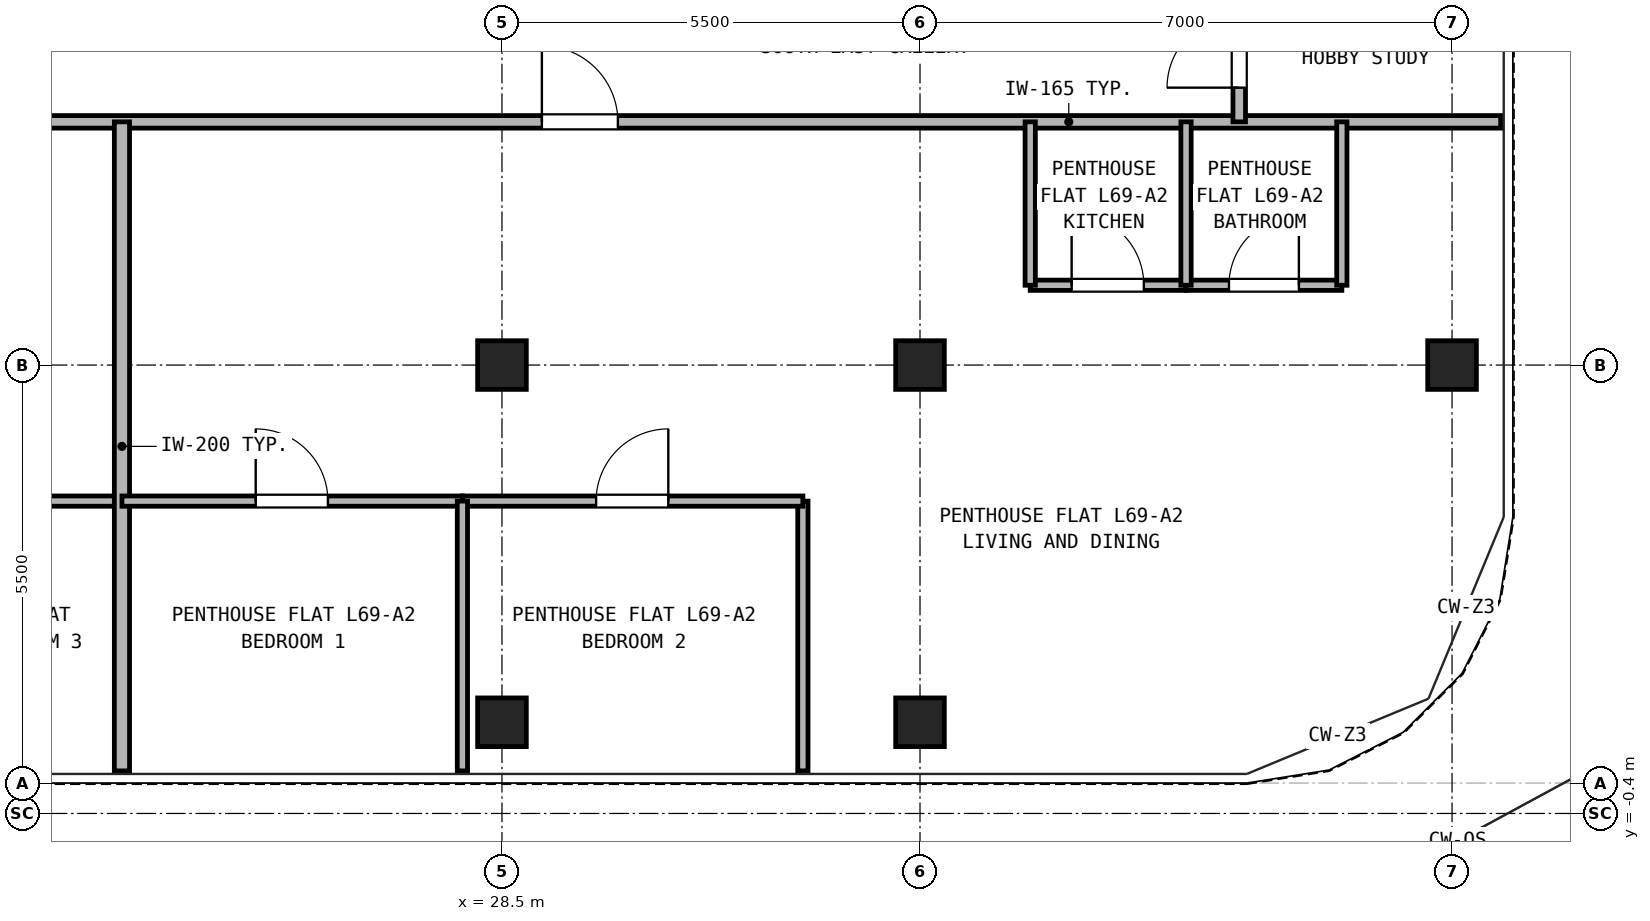
"""IFC4 building model, lengths in metres.
Left out: names, types, materials, properties, quantities, classifications, styles, units other than length and angle.
Written with IfcOpenShell. Run it as: python <this file> out.ifc"""

import sys

from ifc_helpers import new_model, si_unit, direction, frame, frame_2d, origin, origin_2d, place, context, subcontext, project, spatial, rectangle, hollow_rectangle, extrude, source, transform, mapped, element, fill, save


model = new_model("IFC4")
c1 = context("Model", 3, precision=1e-05, world=origin(), true_north=direction((0.0, 1.0)))
c2 = subcontext(c1, "Body", "Model", "MODEL_VIEW")
j1 = project(units=[si_unit("LENGTHUNIT", "METRE"), si_unit("PLANEANGLEUNIT", "RADIAN")], contexts=[c1])
p1 = place(None, origin())
s1 = spatial("IfcSite", under=j1, at=p1, CompositionType="ELEMENT")
p2 = place(p1, origin())
s2 = spatial("IfcBuilding", under=s1, at=p2, CompositionType="ELEMENT")
p3 = place(p2, frame((0.0, 0.0, 242.5)))
s3 = spatial("IfcBuildingStorey", under=s2, at=p3, CompositionType="ELEMENT", Elevation=242.5)
m1 = source(origin(), c2, "Body", "SweptSolid", [
    extrude(hollow_rectangle(XDim=0.64, YDim=0.64, WallThickness=0.035, at=origin_2d()), origin(), (0.0, 0.0, 1.0), 2.98),
])
for number, where, z_axis, x_axis in (
    (1, (28.5, 0.8, 0.0), (0.0, 0.0, 1.0), (1.0, 0.0, 0.0)),
    (2, (34.0, 0.8, 0.0), (0.0, 0.0, 1.0), (1.0, 0.0, 0.0)),
    (3, (41.0, 5.5, 0.0), (0.0, 0.0, 1.0), (1.0, 0.0, 0.0)),
    (4, (28.5, 5.5, 0.0), (0.0, 0.0, 1.0), (1.0, 0.0, 0.0)),
    (5, (34.0, 5.5, 0.0), (0.0, 0.0, 1.0), (1.0, 0.0, 0.0)),
):
    element("IfcColumn", number, at=place(p3, frame(where, z_axis=z_axis, x_axis=x_axis)), inside=s3, PredefinedType="COLUMN", context=c2, shape_type="MappedRepresentation", body=[
        mapped(m1, transform((0.0, 0.0, 0.0), x_axis=(1.0, 0.0, 0.0), y_axis=(0.0, 1.0, 0.0), z_axis=(0.0, 0.0, 1.0), scale=1.0)),
    ])
p4 = place(p3, frame((5.36, 8.7, 0.0), z_axis=(0.0, 0.0, 1.0), x_axis=(1.0, 0.0, 0.0)))
e6 = element("IfcWall", 6, at=p4, inside=s3, PredefinedType="PARTITIONING", context=c2, shape_type="SweptSolid", body=[
    extrude(rectangle(XDim=36.28, YDim=0.165, at=frame_2d((18.14, 0.0))), origin(), (0.0, 0.0, 1.0), 2.655),
])
p5 = place(p4, frame((11.615, 0.0, 0.0)))
e7 = element("IfcOpeningElement", 7, at=p5, cuts=e6, PredefinedType="OPENING", context=c2, shape_type="SweptSolid", body=[
    extrude(rectangle(XDim=1.0, YDim=2.15, at=frame_2d((0.5, 1.075))), frame((0.0, 0.093, 0.0), z_axis=(0.0, -1.0, 0.0), x_axis=(1.0, 0.0, 0.0)), (0.0, 0.0, 1.0), 0.185),
])
p6 = place(p4, frame((23.665, 0.0, 0.0)))
e8 = element("IfcOpeningElement", 8, at=p6, cuts=e6, PredefinedType="OPENING", context=c2, shape_type="SweptSolid", body=[
    extrude(rectangle(XDim=1.0, YDim=2.15, at=frame_2d((0.5, 1.075))), frame((0.0, 0.093, 0.0), z_axis=(0.0, -1.0, 0.0), x_axis=(1.0, 0.0, 0.0)), (0.0, 0.0, 1.0), 0.185),
])
p7 = place(p3, frame((38.2, 8.7, 0.0), z_axis=(0.0, 0.0, 1.0), x_axis=(0.0, 1.0, 0.0)))
e9 = element("IfcWall", 9, at=p7, inside=s3, PredefinedType="PARTITIONING", context=c2, shape_type="SweptSolid", body=[
    extrude(rectangle(XDim=2.0, YDim=0.165, at=frame_2d((1.0, 0.0))), origin(), (0.0, 0.0, 1.0), 2.98),
])
p8 = place(p7, frame((0.45, 0.0, 0.0)))
e10 = element("IfcOpeningElement", 10, at=p8, cuts=e9, PredefinedType="OPENING", context=c2, shape_type="SweptSolid", body=[
    extrude(rectangle(XDim=0.95, YDim=2.15, at=frame_2d((0.475, 1.075))), frame((0.0, 0.093, 0.0), z_axis=(0.0, -1.0, 0.0), x_axis=(1.0, 0.0, 0.0)), (0.0, 0.0, 1.0), 0.185),
])
p9 = place(p3, frame((20.05, 3.71, 0.0), z_axis=(0.0, 0.0, 1.0), x_axis=(1.0, 0.0, 0.0)))
e11 = element("IfcWall", 11, at=p9, inside=s3, PredefinedType="PARTITIONING", context=c2, shape_type="SweptSolid", body=[
    extrude(rectangle(XDim=3.45, YDim=0.135, at=frame_2d((1.725, 0.0))), origin(), (0.0, 0.0, 1.0), 2.98),
])
p10 = place(p9, frame((1.245, 0.0, 0.0)))
e12 = element("IfcOpeningElement", 12, at=p10, cuts=e11, PredefinedType="OPENING", context=c2, shape_type="SweptSolid", body=[
    extrude(rectangle(XDim=0.95, YDim=2.15, at=frame_2d((0.475, 1.075))), frame((0.0, 0.077, 0.0), z_axis=(0.0, -1.0, 0.0), x_axis=(1.0, 0.0, 0.0)), (0.0, 0.0, 1.0), 0.155),
])
p11 = place(p3, frame((23.5, 0.16, 0.0), z_axis=(0.0, 0.0, 1.0), x_axis=(0.0, 1.0, 0.0)))
e13 = element("IfcWall", 13, at=p11, inside=s3, PredefinedType="PARTITIONING", context=c2, shape_type="SweptSolid", body=[
    extrude(rectangle(XDim=8.54, YDim=0.2, at=frame_2d((4.27, 0.0))), origin(), (0.0, 0.0, 1.0), 2.98),
])
p12 = place(p3, frame((35.45, 6.55, 0.0), z_axis=(0.0, 0.0, 1.0), x_axis=(1.0, 0.0, 0.0)))
e14 = element("IfcWall", 14, at=p12, inside=s3, PredefinedType="PARTITIONING", context=c2, shape_type="SweptSolid", body=[
    extrude(rectangle(XDim=2.05, YDim=0.135, at=frame_2d((1.025, 0.0))), origin(), (0.0, 0.0, 1.0), 2.98),
])
p13 = place(p12, frame((0.545, 0.0, 0.0)))
e15 = element("IfcOpeningElement", 15, at=p13, cuts=e14, PredefinedType="OPENING", context=c2, shape_type="SweptSolid", body=[
    extrude(rectangle(XDim=0.95, YDim=2.15, at=frame_2d((0.475, 1.075))), frame((0.0, 0.077, 0.0), z_axis=(0.0, -1.0, 0.0), x_axis=(1.0, 0.0, 0.0)), (0.0, 0.0, 1.0), 0.155),
])
p14 = place(p3, frame((37.5, 6.55, 0.0), z_axis=(0.0, 0.0, 1.0), x_axis=(1.0, 0.0, 0.0)))
e16 = element("IfcWall", 16, at=p14, inside=s3, PredefinedType="PARTITIONING", context=c2, shape_type="SweptSolid", body=[
    extrude(rectangle(XDim=2.05, YDim=0.135, at=frame_2d((1.025, 0.0))), origin(), (0.0, 0.0, 1.0), 2.98),
])
p15 = place(p14, frame((0.565, 0.0, 0.0)))
e17 = element("IfcOpeningElement", 17, at=p15, cuts=e16, PredefinedType="OPENING", context=c2, shape_type="SweptSolid", body=[
    extrude(rectangle(XDim=0.92, YDim=2.1, at=frame_2d((0.46, 1.05))), frame((0.0, 0.077, 0.0), z_axis=(0.0, -1.0, 0.0), x_axis=(1.0, 0.0, 0.0)), (0.0, 0.0, 1.0), 0.155),
])
for number, where, z_axis, x_axis in (
    (18, (35.45, 6.55, 0.0), (0.0, 0.0, 1.0), (0.0, 1.0, 0.0)),
    (19, (37.5, 6.55, 0.0), (0.0, 0.0, 1.0), (0.0, 1.0, 0.0)),
    (20, (39.55, 6.55, 0.0), (0.0, 0.0, 1.0), (0.0, 1.0, 0.0)),
):
    element("IfcWall", number, at=place(p3, frame(where, z_axis=z_axis, x_axis=x_axis)), inside=s3, PredefinedType="PARTITIONING", context=c2, shape_type="SweptSolid", body=[
        extrude(rectangle(XDim=2.15, YDim=0.135, at=frame_2d((1.075, 0.0))), origin(), (0.0, 0.0, 1.0), 2.98),
    ])
p16 = place(p3, frame((32.459, 0.16, 0.0), z_axis=(0.0, 0.0, 1.0), x_axis=(0.0, 1.0, 0.0)))
e21 = element("IfcWall", 21, at=p16, inside=s3, PredefinedType="PARTITIONING", context=c2, shape_type="SweptSolid", body=[
    extrude(rectangle(XDim=3.55, YDim=0.135, at=frame_2d((1.775, 0.0))), origin(), (0.0, 0.0, 1.0), 2.98),
])
p17 = place(p3, frame((23.5, 3.71, 0.0), z_axis=(0.0, 0.0, 1.0), x_axis=(1.0, 0.0, 0.0)))
e22 = element("IfcWall", 22, at=p17, inside=s3, PredefinedType="PARTITIONING", context=c2, shape_type="SweptSolid", body=[
    extrude(rectangle(XDim=4.479, YDim=0.135, at=frame_2d((2.24, 0.0))), origin(), (0.0, 0.0, 1.0), 2.98),
])
p18 = place(p17, frame((1.76, 0.0, 0.0)))
e23 = element("IfcOpeningElement", 23, at=p18, cuts=e22, PredefinedType="OPENING", context=c2, shape_type="SweptSolid", body=[
    extrude(rectangle(XDim=0.95, YDim=2.15, at=frame_2d((0.475, 1.075))), frame((0.0, 0.077, 0.0), z_axis=(0.0, -1.0, 0.0), x_axis=(1.0, 0.0, 0.0)), (0.0, 0.0, 1.0), 0.155),
])
p19 = place(p3, frame((27.979, 3.71, 0.0), z_axis=(0.0, 0.0, 1.0), x_axis=(1.0, 0.0, 0.0)))
e24 = element("IfcWall", 24, at=p19, inside=s3, PredefinedType="PARTITIONING", context=c2, shape_type="SweptSolid", body=[
    extrude(rectangle(XDim=4.479, YDim=0.135, at=frame_2d((2.24, 0.0))), origin(), (0.0, 0.0, 1.0), 2.98),
])
p20 = place(p19, frame((1.759, 0.0, 0.0)))
e25 = element("IfcOpeningElement", 25, at=p20, cuts=e24, PredefinedType="OPENING", context=c2, shape_type="SweptSolid", body=[
    extrude(rectangle(XDim=0.95, YDim=2.15, at=frame_2d((0.475, 1.075))), frame((0.0, 0.077, 0.0), z_axis=(0.0, -1.0, 0.0), x_axis=(1.0, 0.0, 0.0)), (0.0, 0.0, 1.0), 0.155),
])
p21 = place(p3, frame((27.979, 0.16, 0.0), z_axis=(0.0, 0.0, 1.0), x_axis=(0.0, 1.0, 0.0)))
e26 = element("IfcWall", 26, at=p21, inside=s3, PredefinedType="PARTITIONING", context=c2, shape_type="SweptSolid", body=[
    extrude(rectangle(XDim=3.55, YDim=0.135, at=frame_2d((1.775, 0.0))), origin(), (0.0, 0.0, 1.0), 2.98),
])
p22 = place(p13, origin())
e27 = element("IfcDoor", 27, at=p22, inside=s3, OperationType="SINGLE_SWING_LEFT", PredefinedType="DOOR", context=c2, shape_type="SweptSolid", body=[
    extrude(rectangle(XDim=0.95, YDim=2.15, at=frame_2d((0.475, 1.075))), frame((0.0, 0.025, 0.0), z_axis=(0.0, -1.0, 0.0), x_axis=(1.0, 0.0, 0.0)), (0.0, 0.0, 1.0), 0.05),
])
fill(e15, e27)
p23 = place(p15, origin())
e28 = element("IfcDoor", 28, at=p23, inside=s3, OperationType="SINGLE_SWING_RIGHT", PredefinedType="DOOR", context=c2, shape_type="SweptSolid", body=[
    extrude(rectangle(XDim=0.92, YDim=2.1, at=frame_2d((0.46, 1.05))), frame((0.0, 0.025, 0.0), z_axis=(0.0, -1.0, 0.0), x_axis=(1.0, 0.0, 0.0)), (0.0, 0.0, 1.0), 0.05),
])
fill(e17, e28)
p24 = place(p18, frame((0.95, 0.0, 0.0), z_axis=(0.0, 0.0, 1.0), x_axis=(-1.0, 0.0, 0.0)))
e29 = element("IfcDoor", 29, at=p24, inside=s3, OperationType="SINGLE_SWING_LEFT", PredefinedType="DOOR", context=c2, shape_type="SweptSolid", body=[
    extrude(rectangle(XDim=0.95, YDim=2.15, at=frame_2d((0.475, 1.075))), frame((0.0, 0.025, 0.0), z_axis=(0.0, -1.0, 0.0), x_axis=(1.0, 0.0, 0.0)), (0.0, 0.0, 1.0), 0.05),
])
fill(e23, e29)
p25 = place(p20, frame((0.95, 0.0, 0.0), z_axis=(0.0, 0.0, 1.0), x_axis=(-1.0, 0.0, 0.0)))
e30 = element("IfcDoor", 30, at=p25, inside=s3, OperationType="SINGLE_SWING_RIGHT", PredefinedType="DOOR", context=c2, shape_type="SweptSolid", body=[
    extrude(rectangle(XDim=0.95, YDim=2.15, at=frame_2d((0.475, 1.075))), frame((0.0, 0.025, 0.0), z_axis=(0.0, -1.0, 0.0), x_axis=(1.0, 0.0, 0.0)), (0.0, 0.0, 1.0), 0.05),
])
fill(e25, e30)
p26 = place(p6, frame((1.0, 0.0, 0.0), z_axis=(0.0, 0.0, 1.0), x_axis=(-1.0, 0.0, 0.0)))
e31 = element("IfcDoor", 31, at=p26, inside=s3, OperationType="SINGLE_SWING_LEFT", PredefinedType="DOOR", context=c2, shape_type="SweptSolid", body=[
    extrude(rectangle(XDim=1.0, YDim=2.15, at=frame_2d((0.5, 1.075))), frame((0.0, 0.025, 0.0), z_axis=(0.0, -1.0, 0.0), x_axis=(1.0, 0.0, 0.0)), (0.0, 0.0, 1.0), 0.05),
])
fill(e8, e31)
p27 = place(p8, origin())
e32 = element("IfcDoor", 32, at=p27, inside=s3, OperationType="SINGLE_SWING_LEFT", PredefinedType="DOOR", context=c2, shape_type="SweptSolid", body=[
    extrude(rectangle(XDim=0.95, YDim=2.15, at=frame_2d((0.475, 1.075))), frame((0.0, 0.025, 0.0), z_axis=(0.0, -1.0, 0.0), x_axis=(1.0, 0.0, 0.0)), (0.0, 0.0, 1.0), 0.05),
])
fill(e10, e32)
save(model, sys.argv[1])
